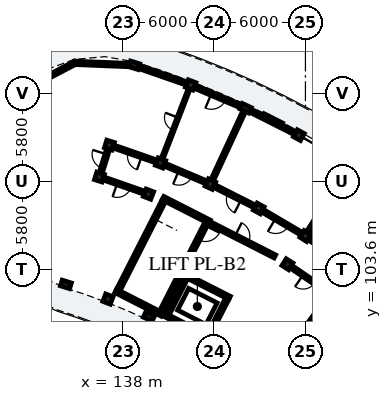
"""IFC4 building model, lengths in metres.
Left out: names, types, materials, properties, quantities, classifications, styles, units other than length and angle.
Written with IfcOpenShell. Run it as: python <this file> out.ifc"""

import sys

from ifc_helpers import new_model, si_unit, direction, frame, frame_2d, origin, origin_2d, place, context, subcontext, project, spatial, rectangle, extrude, element, fill, save


model = new_model("IFC4")
c1 = context("Model", 3, precision=1e-05, world=origin(), true_north=direction((0.0, 1.0)))
c2 = subcontext(c1, "Body", "Model", "MODEL_VIEW")
j1 = project(units=[si_unit("LENGTHUNIT", "METRE"), si_unit("PLANEANGLEUNIT", "RADIAN")], contexts=[c1])
p1 = place(None, origin())
s1 = spatial("IfcSite", under=j1, at=p1, CompositionType="ELEMENT")
p2 = place(p1, origin())
s2 = spatial("IfcBuilding", under=s1, at=p2, CompositionType="ELEMENT")
p3 = place(p2, frame((0.0, 0.0, 42.44)))
s3 = spatial("IfcBuildingStorey", under=s2, at=p3, CompositionType="ELEMENT", Elevation=42.44)
p4 = place(p3, frame((140.684, 108.139, 0.0), z_axis=(0.0, 0.0, 1.0), x_axis=(-0.453992276384, -0.891005618941, 0.0)))
e1 = element("IfcWall", 1, at=p4, inside=s3, PredefinedType="SHEAR", context=c2, shape_type="SweptSolid", body=[
    extrude(rectangle(XDim=6.6, YDim=0.25, at=frame_2d((3.3, 0.0))), origin(), (0.0, 0.0, 1.0), 3.11),
])
p5 = place(p3, frame((137.52, 102.203, 0.0), z_axis=(0.0, 0.0, 1.0), x_axis=(0.891003540237, -0.453996356025, 0.0)))
e2 = element("IfcWall", 2, at=p5, inside=s3, PredefinedType="SHEAR", context=c2, shape_type="SweptSolid", body=[
    extrude(rectangle(XDim=3.42, YDim=0.25, at=frame_2d((1.71, 0.0))), origin(), (0.0, 0.0, 1.0), 3.11),
])
p6 = place(p3, frame((140.629, 108.307, 0.0), z_axis=(0.0, 0.0, 1.0), x_axis=(0.891032414707, -0.453939683153, 0.0)))
e3 = element("IfcWall", 3, at=p6, inside=s3, PredefinedType="SHEAR", context=c2, shape_type="SweptSolid", body=[
    extrude(rectangle(XDim=3.42, YDim=0.25, at=frame_2d((1.71, 0.0))), origin(), (0.0, 0.0, 1.0), 3.11),
])
p7 = place(p3, frame((143.509, 106.699, 0.0), z_axis=(0.0, 0.0, 1.0), x_axis=(-0.453992276384, -0.891005618941, 0.0)))
e4 = element("IfcWall", 4, at=p7, inside=s3, PredefinedType="SHEAR", context=c2, shape_type="SweptSolid", body=[
    extrude(rectangle(XDim=6.6, YDim=0.25, at=frame_2d((3.3, 0.0))), origin(), (0.0, 0.0, 1.0), 3.11),
])
p8 = place(p7, frame((0.22, 0.0, 0.0)))
e5 = element("IfcOpeningElement", 5, at=p8, cuts=e4, PredefinedType="OPENING", context=c2, shape_type="SweptSolid", body=[
    extrude(rectangle(XDim=1.05, YDim=2.15, at=frame_2d((0.525, 1.075))), frame((0.0, 0.135, 0.0), z_axis=(0.0, -1.0, 0.0), x_axis=(1.0, 0.0, 0.0)), (0.0, 0.0, 1.0), 0.27),
])
p9 = place(p3, frame((142.103, 103.224, 0.0), z_axis=(0.0, 0.0, 1.0), x_axis=(0.891001200497, -0.454000947921, 0.0)))
e6 = element("IfcWall", 6, at=p9, inside=s3, PredefinedType="SHEAR", context=c2, shape_type="SweptSolid", body=[
    extrude(rectangle(XDim=3.26, YDim=0.23, at=frame_2d((1.63, 0.0))), origin(), (0.0, 0.0, 1.0), 3.11),
])
p10 = place(p9, frame((0.9, 0.0, 0.0)))
e7 = element("IfcOpeningElement", 7, at=p10, cuts=e6, PredefinedType="OPENING", context=c2, shape_type="SweptSolid", body=[
    extrude(rectangle(XDim=1.0, YDim=2.15, at=frame_2d((0.5, 1.075))), frame((0.0, 0.125, 0.0), z_axis=(0.0, -1.0, 0.0), x_axis=(1.0, 0.0, 0.0)), (0.0, 0.0, 1.0), 0.25),
])
p11 = place(p3, frame((140.772, 100.613, 0.0), z_axis=(0.0, 0.0, 1.0), x_axis=(0.891016635648, -0.453970654337, 0.0)))
e8 = element("IfcWall", 8, at=p11, inside=s3, PredefinedType="SHEAR", context=c2, shape_type="SweptSolid", body=[
    extrude(rectangle(XDim=3.26, YDim=0.23, at=frame_2d((1.63, 0.0))), origin(), (0.0, 0.0, 1.0), 3.11),
])
for number, where, z_axis, x_axis in (
    (9, (142.153, 103.069, 0.0), (0.0, 0.0, 1.0), (-0.454, -0.891, 0.0)),
    (10, (144.853, 101.694, 0.0), (0.0, 0.0, 1.0), (-0.454, -0.891, 0.0)),
):
    element("IfcWall", number, at=place(p3, frame(where, z_axis=z_axis, x_axis=x_axis)), inside=s3, PredefinedType="SHEAR", context=c2, shape_type="SweptSolid", body=[
        extrude(rectangle(XDim=2.7, YDim=0.23, at=frame_2d((1.35, 0.0))), origin(), (0.0, 0.0, 1.0), 3.11),
    ])
for number, where, z_axis, x_axis in (
    (11, (148.817, 103.957, 0.0), (0.0, 0.0, 1.0), (0.536, 0.844, 0.0)),
    (12, (149.997, 105.813, 0.0), (0.0, 0.0, 1.0), (0.536, 0.844, 0.0)),
    (13, (146.928, 107.625, 0.0), (0.0, 0.0, 1.0), (0.48, 0.877, 0.0)),
    (14, (149.567, 112.451, 0.0), (0.0, 0.0, 1.0), (0.48, 0.877, 0.0)),
):
    element("IfcColumn", number, at=place(p3, frame(where, z_axis=z_axis, x_axis=x_axis)), inside=s3, PredefinedType="COLUMN", context=c2, shape_type="SweptSolid", body=[
        extrude(rectangle(XDim=0.52, YDim=0.52, at=origin_2d()), origin(), (0.0, 0.0, 1.0), 3.1),
    ])
p12 = place(p3, frame((139.707, 100.522, 0.0), z_axis=(0.0, 0.0, 1.0), x_axis=(0.420859860775, 0.907125668024, 0.0)))
e15 = element("IfcColumn", 15, at=p12, inside=s3, PredefinedType="PILASTER", context=c2, shape_type="SweptSolid", body=[
    extrude(rectangle(XDim=0.39, YDim=0.63, at=origin_2d()), origin(), (0.0, 0.0, 1.0), 3.1),
])
p13 = place(p3, frame((143.748, 109.23, 0.0), z_axis=(0.0, 0.0, 1.0), x_axis=(0.420859860775, 0.907125668024, 0.0)))
e16 = element("IfcColumn", 16, at=p13, inside=s3, PredefinedType="COLUMN", context=c2, shape_type="SweptSolid", body=[
    extrude(rectangle(XDim=0.52, YDim=0.52, at=origin_2d()), origin(), (0.0, 0.0, 1.0), 3.1),
])
p14 = place(p3, frame((146.062, 114.219, 0.0), z_axis=(0.0, 0.0, 1.0), x_axis=(0.420859860775, 0.907125668024, 0.0)))
e17 = element("IfcColumn", 17, at=p14, inside=s3, PredefinedType="PILASTER", context=c2, shape_type="SweptSolid", body=[
    extrude(rectangle(XDim=0.39, YDim=0.63, at=origin_2d()), origin(), (0.0, 0.0, 1.0), 3.1),
])
for number, where, z_axis, x_axis in (
    (18, (137.01, 101.667, 0.0), (0.0, 0.0, 1.0), (0.36, 0.933, 0.0)),
    (19, (139.675, 108.57, 0.0), (0.0, 0.0, 1.0), (0.36, 0.933, 0.0)),
    (20, (140.468, 110.622, 0.0), (0.0, 0.0, 1.0), (0.36, 0.933, 0.0)),
    (21, (142.448, 115.753, 0.0), (0.0, 0.0, 1.0), (0.36, 0.933, 0.0)),
):
    element("IfcColumn", number, at=place(p3, frame(where, z_axis=z_axis, x_axis=x_axis)), inside=s3, PredefinedType="COLUMN", context=c2, shape_type="SweptSolid", body=[
        extrude(rectangle(XDim=0.52, YDim=0.52, at=origin_2d()), origin(), (0.0, 0.0, 1.0), 3.1),
    ])
p15 = place(p3, frame((134.243, 102.631, 0.0), z_axis=(0.0, 0.0, 1.0), x_axis=(0.297930225503, 0.954587649581, 0.0)))
e22 = element("IfcColumn", 22, at=p15, inside=s3, PredefinedType="PILASTER", context=c2, shape_type="SweptSolid", body=[
    extrude(rectangle(XDim=0.39, YDim=0.63, at=origin_2d()), origin(), (0.0, 0.0, 1.0), 3.1),
])
for number, where, z_axis, x_axis in (
    (23, (136.448, 109.695, 0.0), (0.0, 0.0, 1.0), (0.298, 0.955, 0.0)),
    (24, (137.103, 111.795, 0.0), (0.0, 0.0, 1.0), (0.298, 0.955, 0.0)),
):
    element("IfcColumn", number, at=place(p3, frame(where, z_axis=z_axis, x_axis=x_axis)), inside=s3, PredefinedType="COLUMN", context=c2, shape_type="SweptSolid", body=[
        extrude(rectangle(XDim=0.52, YDim=0.52, at=origin_2d()), origin(), (0.0, 0.0, 1.0), 3.1),
    ])
p16 = place(p3, frame((138.742, 117.046, 0.0), z_axis=(0.0, 0.0, 1.0), x_axis=(0.297930225503, 0.954587649581, 0.0)))
e25 = element("IfcColumn", 25, at=p16, inside=s3, PredefinedType="PILASTER", context=c2, shape_type="SweptSolid", body=[
    extrude(rectangle(XDim=0.39, YDim=0.63, at=origin_2d()), origin(), (0.0, 0.0, 1.0), 3.1),
])
p17 = place(p3, frame((149.362, 112.554, 0.0), z_axis=(0.0, 0.0, 1.0), x_axis=(-0.892747589921, 0.450557144755, 0.0)))
e26 = element("IfcWall", 26, at=p17, inside=s3, PredefinedType="SOLIDWALL", context=c2, shape_type="SweptSolid", body=[
    extrude(rectangle(XDim=3.531, YDim=0.22, at=frame_2d((1.765, 0.0))), origin(), (0.0, 0.0, 1.0), 2.355),
])
p18 = place(p17, frame((1.075, 0.0, 0.55)))
e27 = element("IfcOpeningElement", 27, at=p18, cuts=e26, PredefinedType="OPENING", context=c2, shape_type="SweptSolid", body=[
    extrude(rectangle(XDim=1.38, YDim=1.56, at=frame_2d((0.69, 0.78))), frame((0.0, 0.12, 0.0), z_axis=(0.0, -1.0, 0.0), x_axis=(1.0, 0.0, 0.0)), (0.0, 0.0, 1.0), 0.24),
])
p19 = place(p3, frame((145.91, 114.284, 0.0), z_axis=(0.0, 0.0, 1.0), x_axis=(-0.920495122718, 0.390754051869, 0.0)))
e28 = element("IfcWall", 28, at=p19, inside=s3, PredefinedType="SOLIDWALL", context=c2, shape_type="SweptSolid", body=[
    extrude(rectangle(XDim=3.531, YDim=0.22, at=frame_2d((1.765, 0.0))), origin(), (0.0, 0.0, 1.0), 2.355),
])
p20 = place(p19, frame((1.255, 0.0, 0.0)))
e29 = element("IfcOpeningElement", 29, at=p20, cuts=e28, PredefinedType="OPENING", context=c2, shape_type="SweptSolid", body=[
    extrude(rectangle(XDim=1.02, YDim=2.14, at=frame_2d((0.51, 1.07))), frame((0.0, 0.12, 0.0), z_axis=(0.0, -1.0, 0.0), x_axis=(1.0, 0.0, 0.0)), (0.0, 0.0, 1.0), 0.24),
])
p21 = place(p3, frame((142.231, 115.829, 0.0), z_axis=(0.0, 0.0, 1.0), x_axis=(-0.944237181458, 0.329266070453, 0.0)))
e30 = element("IfcWall", 30, at=p21, inside=s3, PredefinedType="SOLIDWALL", context=c2, shape_type="SweptSolid", body=[
    extrude(rectangle(XDim=3.531, YDim=0.22, at=frame_2d((1.765, 0.0))), origin(), (0.0, 0.0, 1.0), 2.355),
])
p22 = place(p21, frame((1.125, 0.0, 0.55)))
e31 = element("IfcOpeningElement", 31, at=p22, cuts=e30, PredefinedType="OPENING", context=c2, shape_type="SweptSolid", body=[
    extrude(rectangle(XDim=1.28, YDim=1.56, at=frame_2d((0.64, 0.78))), frame((0.0, 0.12, 0.0), z_axis=(0.0, -1.0, 0.0), x_axis=(1.0, 0.0, 0.0)), (0.0, 0.0, 1.0), 0.24),
])
p23 = place(p3, frame((131.375, 115.39, 0.0), z_axis=(0.0, 0.0, 1.0), x_axis=(0.8856664179, 0.464322082399, 0.0)))
e32 = element("IfcWall", 32, at=p23, inside=s3, PredefinedType="SOLIDWALL", context=c2, shape_type="SweptSolid", body=[
    extrude(rectangle(XDim=3.908, YDim=0.22, at=frame_2d((1.954, 0.0))), origin(), (0.0, 0.0, 1.0), 2.355),
])
p24 = place(p3, frame((134.837, 117.205, 0.0), z_axis=(0.0, 0.0, 1.0), x_axis=(0.99917012986, -0.040731457088, 0.0)))
e33 = element("IfcWall", 33, at=p24, inside=s3, PredefinedType="SOLIDWALL", context=c2, shape_type="SweptSolid", body=[
    extrude(rectangle(XDim=3.908, YDim=0.22, at=frame_2d((1.954, 0.0))), origin(), (0.0, 0.0, 1.0), 2.355),
])
p25 = place(p24, frame((1.029, 0.0, 0.4)))
e34 = element("IfcOpeningElement", 34, at=p25, cuts=e33, PredefinedType="OPENING", context=c2, shape_type="SweptSolid", body=[
    extrude(rectangle(XDim=1.85, YDim=1.72, at=frame_2d((0.925, 0.86))), frame((0.0, 0.12, 0.0), z_axis=(0.0, -1.0, 0.0), x_axis=(1.0, 0.0, 0.0)), (0.0, 0.0, 1.0), 0.24),
])
p26 = place(p3, frame((143.625, 106.696, 0.0), z_axis=(0.0, 0.0, 1.0), x_axis=(0.891003372311, -0.453996685595, 0.0)))
e35 = element("IfcWall", 35, at=p26, inside=s3, PredefinedType="PARTITIONING", context=c2, shape_type="SweptSolid", body=[
    extrude(rectangle(XDim=4.9, YDim=0.22, at=frame_2d((2.45, 0.0))), origin(), (0.0, 0.0, 1.0), 2.34),
])
p27 = place(p26, frame((1.95, 0.0, 0.0)))
e36 = element("IfcOpeningElement", 36, at=p27, cuts=e35, PredefinedType="OPENING", context=c2, shape_type="SweptSolid", body=[
    extrude(rectangle(XDim=0.98, YDim=2.14, at=frame_2d((0.49, 1.07))), frame((0.0, 0.12, 0.0), z_axis=(0.0, -1.0, 0.0), x_axis=(1.0, 0.0, 0.0)), (0.0, 0.0, 1.0), 0.24),
])
p28 = place(p3, frame((147.503, 96.382, 0.0), z_axis=(0.0, 0.0, 1.0), x_axis=(0.590924179316, 0.806727100263, 0.0)))
e37 = element("IfcWall", 37, at=p28, inside=s3, PredefinedType="PARTITIONING", context=c2, shape_type="SweptSolid", body=[
    extrude(rectangle(XDim=6.6, YDim=0.125, at=frame_2d((3.3, 0.0))), origin(), (0.0, 0.0, 1.0), 2.37),
])
p29 = place(p28, frame((2.855, 0.0, 0.0)))
e38 = element("IfcOpeningElement", 38, at=p29, cuts=e37, PredefinedType="OPENING", context=c2, shape_type="SweptSolid", body=[
    extrude(rectangle(XDim=0.89, YDim=2.1, at=frame_2d((0.445, 1.05))), frame((0.0, 0.073, 0.0), z_axis=(0.0, -1.0, 0.0), x_axis=(1.0, 0.0, 0.0)), (0.0, 0.0, 1.0), 0.145),
])
p30 = place(p3, frame((152.65, 104.001, 0.0), z_axis=(0.0, 0.0, 1.0), x_axis=(-0.825779671787, 0.563992848947, 0.0)))
e39 = element("IfcWall", 39, at=p30, inside=s3, PredefinedType="PARTITIONING", context=c2, shape_type="SweptSolid", body=[
    extrude(rectangle(XDim=2.863, YDim=0.205, at=frame_2d((1.432, 0.0))), origin(), (0.0, 0.0, 1.0), 2.37),
])
p31 = place(p30, frame((0.967, 0.0, 0.0)))
e40 = element("IfcOpeningElement", 40, at=p31, cuts=e39, PredefinedType="OPENING", context=c2, shape_type="SweptSolid", body=[
    extrude(rectangle(XDim=0.93, YDim=2.12, at=frame_2d((0.465, 1.06))), frame((0.0, 0.113, 0.0), z_axis=(0.0, -1.0, 0.0), x_axis=(1.0, 0.0, 0.0)), (0.0, 0.0, 1.0), 0.225),
])
p32 = place(p3, frame((151.35, 102.226, 0.0), z_axis=(0.0, 0.0, 1.0), x_axis=(-0.825752009056, 0.56403334967, 0.0)))
e41 = element("IfcWall", 41, at=p32, inside=s3, PredefinedType="PARTITIONING", context=c2, shape_type="SweptSolid", body=[
    extrude(rectangle(XDim=2.718, YDim=0.205, at=frame_2d((1.359, 0.0))), origin(), (0.0, 0.0, 1.0), 2.37),
])
p33 = place(p32, frame((0.894, 0.0, 0.0)))
e42 = element("IfcOpeningElement", 42, at=p33, cuts=e41, PredefinedType="OPENING", context=c2, shape_type="SweptSolid", body=[
    extrude(rectangle(XDim=0.93, YDim=2.12, at=frame_2d((0.465, 1.06))), frame((0.0, 0.113, 0.0), z_axis=(0.0, -1.0, 0.0), x_axis=(1.0, 0.0, 0.0)), (0.0, 0.0, 1.0), 0.225),
])
p34 = place(p3, frame((150.211, 106.151, 0.0), z_axis=(0.0, 0.0, 1.0), x_axis=(0.536492262982, 0.843905238614, 0.0)))
e43 = element("IfcWall", 43, at=p34, inside=s3, PredefinedType="PARTITIONING", context=c2, shape_type="SweptSolid", body=[
    extrude(rectangle(XDim=4.7, YDim=0.185, at=frame_2d((2.35, 0.0))), origin(), (0.0, 0.0, 1.0), 2.37),
])
p35 = place(p3, frame((149.695, 105.991, 0.0), z_axis=(0.0, 0.0, 1.0), x_axis=(-0.861113214678, 0.508413248753, 0.0)))
e44 = element("IfcWall", 44, at=p35, inside=s3, PredefinedType="PARTITIONING", context=c2, shape_type="SweptSolid", body=[
    extrude(rectangle(XDim=2.863, YDim=0.205, at=frame_2d((1.432, 0.0))), origin(), (0.0, 0.0, 1.0), 2.37),
])
p36 = place(p35, frame((0.937, 0.0, 0.0)))
e45 = element("IfcOpeningElement", 45, at=p36, cuts=e44, PredefinedType="OPENING", context=c2, shape_type="SweptSolid", body=[
    extrude(rectangle(XDim=0.99, YDim=2.16, at=frame_2d((0.495, 1.08))), frame((0.0, 0.113, 0.0), z_axis=(0.0, -1.0, 0.0), x_axis=(1.0, 0.0, 0.0)), (0.0, 0.0, 1.0), 0.225),
])
p37 = place(p3, frame((146.616, 107.782, 0.0), z_axis=(0.0, 0.0, 1.0), x_axis=(-0.89273239336, 0.450587254419, 0.0)))
e46 = element("IfcWall", 46, at=p37, inside=s3, PredefinedType="PARTITIONING", context=c2, shape_type="SweptSolid", body=[
    extrude(rectangle(XDim=2.863, YDim=0.205, at=frame_2d((1.432, 0.0))), origin(), (0.0, 0.0, 1.0), 2.37),
])
p38 = place(p37, frame((0.947, 0.0, 0.0)))
e47 = element("IfcOpeningElement", 47, at=p38, cuts=e46, PredefinedType="OPENING", context=c2, shape_type="SweptSolid", body=[
    extrude(rectangle(XDim=0.97, YDim=2.15, at=frame_2d((0.485, 1.075))), frame((0.0, 0.113, 0.0), z_axis=(0.0, -1.0, 0.0), x_axis=(1.0, 0.0, 0.0)), (0.0, 0.0, 1.0), 0.225),
])
p39 = place(p3, frame((143.916, 109.593, 0.0), z_axis=(0.0, 0.0, 1.0), x_axis=(0.420862519045, 0.907124434718, 0.0)))
e48 = element("IfcWall", 48, at=p39, inside=s3, PredefinedType="PARTITIONING", context=c2, shape_type="SweptSolid", body=[
    extrude(rectangle(XDim=4.7, YDim=0.185, at=frame_2d((2.35, 0.0))), origin(), (0.0, 0.0, 1.0), 2.37),
])
p40 = place(p3, frame((143.425, 109.367, 0.0), z_axis=(0.0, 0.0, 1.0), x_axis=(-0.920511160294, 0.390716270168, 0.0)))
e49 = element("IfcWall", 49, at=p40, inside=s3, PredefinedType="PARTITIONING", context=c2, shape_type="SweptSolid", body=[
    extrude(rectangle(XDim=2.863, YDim=0.205, at=frame_2d((1.432, 0.0))), origin(), (0.0, 0.0, 1.0), 2.37),
])
p41 = place(p40, frame((0.957, 0.0, 0.0)))
e50 = element("IfcOpeningElement", 50, at=p41, cuts=e49, PredefinedType="OPENING", context=c2, shape_type="SweptSolid", body=[
    extrude(rectangle(XDim=0.95, YDim=2.13, at=frame_2d((0.475, 1.065))), frame((0.0, 0.113, 0.0), z_axis=(0.0, -1.0, 0.0), x_axis=(1.0, 0.0, 0.0)), (0.0, 0.0, 1.0), 0.225),
])
p42 = place(p3, frame((140.612, 110.996, 0.0), z_axis=(0.0, 0.0, 1.0), x_axis=(0.360186633854, 0.932880264982, 0.0)))
e51 = element("IfcWall", 51, at=p42, inside=s3, PredefinedType="PARTITIONING", context=c2, shape_type="SweptSolid", body=[
    extrude(rectangle(XDim=4.7, YDim=0.125, at=frame_2d((2.35, 0.0))), origin(), (0.0, 0.0, 1.0), 2.37),
])
p43 = place(p42, frame((1.905, 0.0, 0.0)))
e52 = element("IfcOpeningElement", 52, at=p43, cuts=e51, PredefinedType="OPENING", context=c2, shape_type="SweptSolid", body=[
    extrude(rectangle(XDim=0.89, YDim=2.1, at=frame_2d((0.445, 1.05))), frame((0.0, 0.073, 0.0), z_axis=(0.0, -1.0, 0.0), x_axis=(1.0, 0.0, 0.0)), (0.0, 0.0, 1.0), 0.145),
])
p44 = place(p3, frame((140.137, 110.738, 0.0), z_axis=(0.0, 0.0, 1.0), x_axis=(-0.944253820929, 0.329218349522, 0.0)))
e53 = element("IfcWall", 53, at=p44, inside=s3, PredefinedType="PARTITIONING", context=c2, shape_type="SweptSolid", body=[
    extrude(rectangle(XDim=2.863, YDim=0.205, at=frame_2d((1.432, 0.0))), origin(), (0.0, 0.0, 1.0), 2.37),
])
p45 = place(p44, frame((0.967, 0.0, 0.0)))
e54 = element("IfcOpeningElement", 54, at=p45, cuts=e53, PredefinedType="OPENING", context=c2, shape_type="SweptSolid", body=[
    extrude(rectangle(XDim=0.93, YDim=2.12, at=frame_2d((0.465, 1.06))), frame((0.0, 0.113, 0.0), z_axis=(0.0, -1.0, 0.0), x_axis=(1.0, 0.0, 0.0)), (0.0, 0.0, 1.0), 0.225),
])
p46 = place(p3, frame((139.345, 108.685, 0.0), z_axis=(0.0, 0.0, 1.0), x_axis=(-0.944265123647, 0.329185929627, 0.0)))
e55 = element("IfcWall", 55, at=p46, inside=s3, PredefinedType="PARTITIONING", context=c2, shape_type="SweptSolid", body=[
    extrude(rectangle(XDim=2.718, YDim=0.205, at=frame_2d((1.359, 0.0))), origin(), (0.0, 0.0, 1.0), 2.37),
])
p47 = place(p46, frame((0.894, 0.0, 0.0)))
e56 = element("IfcOpeningElement", 56, at=p47, cuts=e55, PredefinedType="OPENING", context=c2, shape_type="SweptSolid", body=[
    extrude(rectangle(XDim=0.93, YDim=2.12, at=frame_2d((0.465, 1.06))), frame((0.0, 0.113, 0.0), z_axis=(0.0, -1.0, 0.0), x_axis=(1.0, 0.0, 0.0)), (0.0, 0.0, 1.0), 0.225),
])
p48 = place(p3, frame((136.463, 109.743, 0.0), z_axis=(0.0, 0.0, 1.0), x_axis=(0.297857918398, 0.954610213882, 0.0)))
e57 = element("IfcWall", 57, at=p48, inside=s3, PredefinedType="PARTITIONING", context=c2, shape_type="SweptSolid", body=[
    extrude(rectangle(XDim=2.1, YDim=0.205, at=frame_2d((1.05, 0.0))), origin(), (0.0, 0.0, 1.0), 2.37),
])
p49 = place(p48, frame((0.57, 0.0, 0.0)))
e58 = element("IfcOpeningElement", 58, at=p49, cuts=e57, PredefinedType="OPENING", context=c2, shape_type="SweptSolid", body=[
    extrude(rectangle(XDim=0.95, YDim=2.13, at=frame_2d((0.475, 1.065))), frame((0.0, 0.113, 0.0), z_axis=(0.0, -1.0, 0.0), x_axis=(1.0, 0.0, 0.0)), (0.0, 0.0, 1.0), 0.225),
])
p50 = place(p18, origin())
e59 = element("IfcWindow", 59, at=p50, inside=s3, PartitioningType="SINGLE_PANEL", PredefinedType="WINDOW", context=c2, shape_type="SweptSolid", body=[
    extrude(rectangle(XDim=1.38, YDim=1.56, at=frame_2d((0.69, 0.78))), frame((0.0, 0.03, 0.0), z_axis=(0.0, -1.0, 0.0), x_axis=(1.0, 0.0, 0.0)), (0.0, 0.0, 1.0), 0.06),
])
fill(e27, e59)
p51 = place(p20, origin())
e60 = element("IfcDoor", 60, at=p51, inside=s3, OperationType="SINGLE_SWING_RIGHT", PredefinedType="DOOR", context=c2, shape_type="SweptSolid", body=[
    extrude(rectangle(XDim=1.02, YDim=2.14, at=frame_2d((0.51, 1.07))), frame((0.0, 0.025, 0.0), z_axis=(0.0, -1.0, 0.0), x_axis=(1.0, 0.0, 0.0)), (0.0, 0.0, 1.0), 0.05),
])
fill(e29, e60)
p52 = place(p22, origin())
e61 = element("IfcWindow", 61, at=p52, inside=s3, PartitioningType="SINGLE_PANEL", PredefinedType="WINDOW", context=c2, shape_type="SweptSolid", body=[
    extrude(rectangle(XDim=1.28, YDim=1.56, at=frame_2d((0.64, 0.78))), frame((0.0, 0.03, 0.0), z_axis=(0.0, -1.0, 0.0), x_axis=(1.0, 0.0, 0.0)), (0.0, 0.0, 1.0), 0.06),
])
fill(e31, e61)
p53 = place(p25, origin())
e62 = element("IfcWindow", 62, at=p53, inside=s3, PartitioningType="SINGLE_PANEL", PredefinedType="WINDOW", context=c2, shape_type="SweptSolid", body=[
    extrude(rectangle(XDim=1.85, YDim=1.72, at=frame_2d((0.925, 0.86))), frame((0.0, 0.03, 0.0), z_axis=(0.0, -1.0, 0.0), x_axis=(1.0, 0.0, 0.0)), (0.0, 0.0, 1.0), 0.06),
])
fill(e34, e62)
p54 = place(p8, origin())
e63 = element("IfcDoor", 63, at=p54, inside=s3, OperationType="SINGLE_SWING_LEFT", PredefinedType="DOOR", context=c2, shape_type="SweptSolid", body=[
    extrude(rectangle(XDim=1.05, YDim=2.15, at=frame_2d((0.525, 1.075))), frame((0.0, 0.025, 0.0), z_axis=(0.0, -1.0, 0.0), x_axis=(1.0, 0.0, 0.0)), (0.0, 0.0, 1.0), 0.05),
])
fill(e5, e63)
p55 = place(p10, origin())
e64 = element("IfcDoor", 64, at=p55, inside=s3, OperationType="DOUBLE_DOOR_SLIDING", PredefinedType="DOOR", context=c2, shape_type="SweptSolid", body=[
    extrude(rectangle(XDim=1.0, YDim=2.15, at=frame_2d((0.5, 1.075))), frame((0.0, 0.025, 0.0), z_axis=(0.0, -1.0, 0.0), x_axis=(1.0, 0.0, 0.0)), (0.0, 0.0, 1.0), 0.05),
])
fill(e7, e64)
p56 = place(p27, origin())
e65 = element("IfcDoor", 65, at=p56, inside=s3, OperationType="SINGLE_SWING_LEFT", PredefinedType="DOOR", context=c2, shape_type="SweptSolid", body=[
    extrude(rectangle(XDim=0.98, YDim=2.14, at=frame_2d((0.49, 1.07))), frame((0.0, 0.025, 0.0), z_axis=(0.0, -1.0, 0.0), x_axis=(1.0, 0.0, 0.0)), (0.0, 0.0, 1.0), 0.05),
])
fill(e36, e65)
p57 = place(p33, origin())
e66 = element("IfcDoor", 66, at=p57, inside=s3, OperationType="SINGLE_SWING_RIGHT", PredefinedType="DOOR", context=c2, shape_type="SweptSolid", body=[
    extrude(rectangle(XDim=0.93, YDim=2.12, at=frame_2d((0.465, 1.06))), frame((0.0, 0.025, 0.0), z_axis=(0.0, -1.0, 0.0), x_axis=(1.0, 0.0, 0.0)), (0.0, 0.0, 1.0), 0.05),
])
fill(e42, e66)
p58 = place(p36, origin())
e67 = element("IfcDoor", 67, at=p58, inside=s3, OperationType="SINGLE_SWING_RIGHT", PredefinedType="DOOR", context=c2, shape_type="SweptSolid", body=[
    extrude(rectangle(XDim=0.99, YDim=2.16, at=frame_2d((0.495, 1.08))), frame((0.0, 0.025, 0.0), z_axis=(0.0, -1.0, 0.0), x_axis=(1.0, 0.0, 0.0)), (0.0, 0.0, 1.0), 0.05),
])
fill(e45, e67)
p59 = place(p38, origin())
e68 = element("IfcDoor", 68, at=p59, inside=s3, OperationType="SINGLE_SWING_LEFT", PredefinedType="DOOR", context=c2, shape_type="SweptSolid", body=[
    extrude(rectangle(XDim=0.97, YDim=2.15, at=frame_2d((0.485, 1.075))), frame((0.0, 0.025, 0.0), z_axis=(0.0, -1.0, 0.0), x_axis=(1.0, 0.0, 0.0)), (0.0, 0.0, 1.0), 0.05),
])
fill(e47, e68)
p60 = place(p41, origin())
e69 = element("IfcDoor", 69, at=p60, inside=s3, OperationType="SINGLE_SWING_RIGHT", PredefinedType="DOOR", context=c2, shape_type="SweptSolid", body=[
    extrude(rectangle(XDim=0.95, YDim=2.13, at=frame_2d((0.475, 1.065))), frame((0.0, 0.025, 0.0), z_axis=(0.0, -1.0, 0.0), x_axis=(1.0, 0.0, 0.0)), (0.0, 0.0, 1.0), 0.05),
])
fill(e50, e69)
p61 = place(p43, origin())
e70 = element("IfcDoor", 70, at=p61, inside=s3, OperationType="SINGLE_SWING_RIGHT", PredefinedType="DOOR", context=c2, shape_type="SweptSolid", body=[
    extrude(rectangle(XDim=0.89, YDim=2.1, at=frame_2d((0.445, 1.05))), frame((0.0, 0.025, 0.0), z_axis=(0.0, -1.0, 0.0), x_axis=(1.0, 0.0, 0.0)), (0.0, 0.0, 1.0), 0.05),
])
fill(e52, e70)
p62 = place(p45, origin())
e71 = element("IfcDoor", 71, at=p62, inside=s3, OperationType="SINGLE_SWING_LEFT", PredefinedType="DOOR", context=c2, shape_type="SweptSolid", body=[
    extrude(rectangle(XDim=0.93, YDim=2.12, at=frame_2d((0.465, 1.06))), frame((0.0, 0.025, 0.0), z_axis=(0.0, -1.0, 0.0), x_axis=(1.0, 0.0, 0.0)), (0.0, 0.0, 1.0), 0.05),
])
fill(e54, e71)
p63 = place(p47, origin())
e72 = element("IfcDoor", 72, at=p63, inside=s3, OperationType="SINGLE_SWING_RIGHT", PredefinedType="DOOR", context=c2, shape_type="SweptSolid", body=[
    extrude(rectangle(XDim=0.93, YDim=2.12, at=frame_2d((0.465, 1.06))), frame((0.0, 0.025, 0.0), z_axis=(0.0, -1.0, 0.0), x_axis=(1.0, 0.0, 0.0)), (0.0, 0.0, 1.0), 0.05),
])
fill(e56, e72)
p64 = place(p49, origin())
e73 = element("IfcDoor", 73, at=p64, inside=s3, OperationType="SINGLE_SWING_RIGHT", PredefinedType="DOOR", context=c2, shape_type="SweptSolid", body=[
    extrude(rectangle(XDim=0.95, YDim=2.13, at=frame_2d((0.475, 1.065))), frame((0.0, 0.025, 0.0), z_axis=(0.0, -1.0, 0.0), x_axis=(1.0, 0.0, 0.0)), (0.0, 0.0, 1.0), 0.05),
])
fill(e58, e73)
save(model, sys.argv[1])
